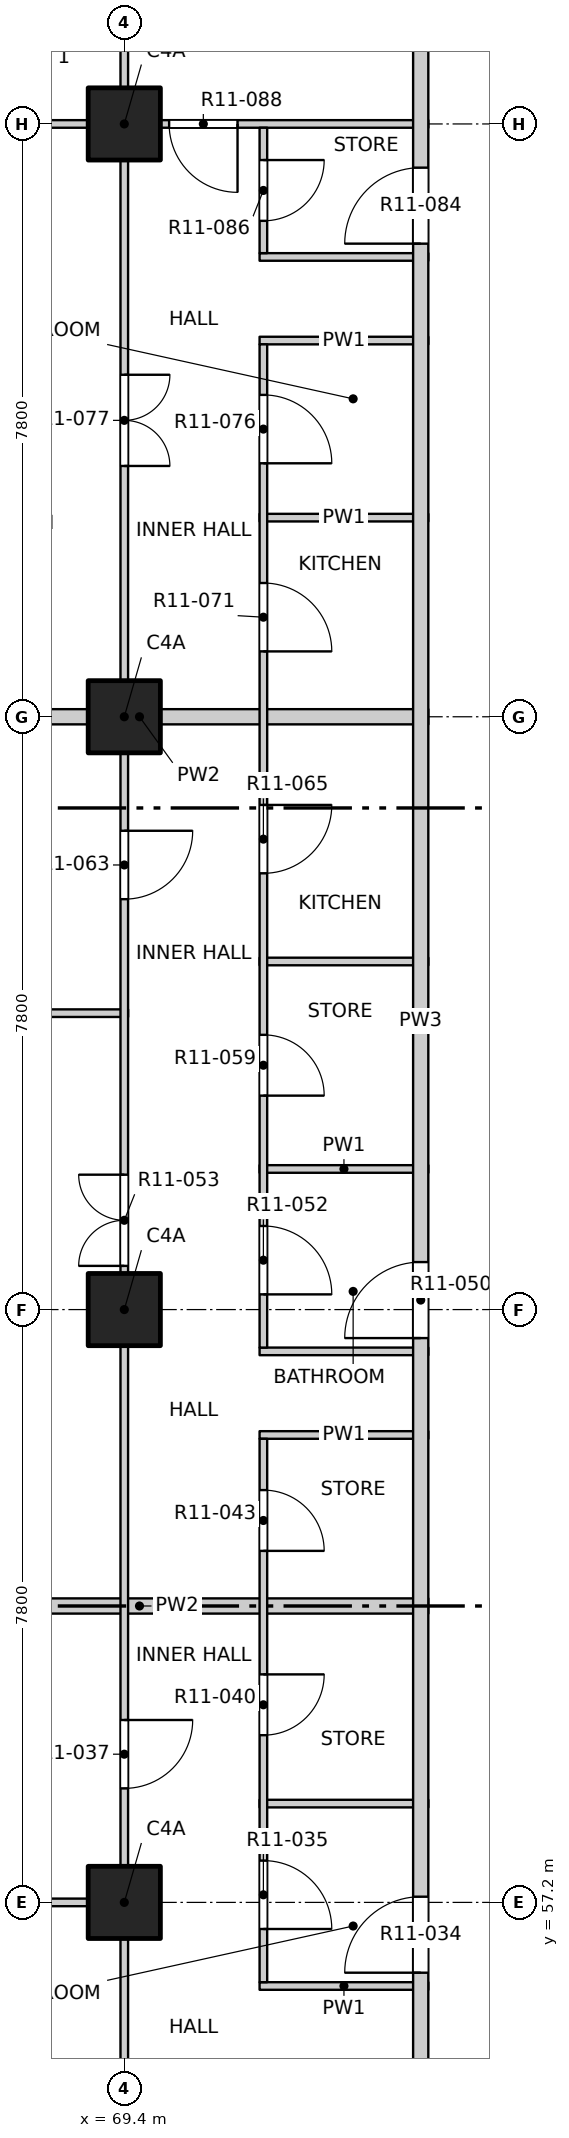
"""IFC4 building model, lengths in metres.
Left out: names, types, materials, properties, quantities, classifications, styles, units other than length and angle.
Written with IfcOpenShell. Run it as: python <this file> out.ifc"""

import sys

from ifc_helpers import new_model, si_unit, direction, frame, frame_2d, origin, origin_2d, place, context, subcontext, project, spatial, rectangle, extrude, element, fill, save


model = new_model("IFC4")
c1 = context("Model", 3, precision=1e-05, world=origin(), true_north=direction((0.0, 1.0)))
c2 = subcontext(c1, "Body", "Model", "MODEL_VIEW")
j1 = project(units=[si_unit("LENGTHUNIT", "METRE"), si_unit("PLANEANGLEUNIT", "RADIAN")], contexts=[c1])
p1 = place(None, origin())
s1 = spatial("IfcSite", under=j1, at=p1, CompositionType="ELEMENT")
p2 = place(p1, origin())
s2 = spatial("IfcBuilding", under=s1, at=p2, CompositionType="ELEMENT")
p3 = place(p2, frame((0.0, 0.0, 130.5)))
s3 = spatial("IfcBuildingStorey", under=s2, at=p3, CompositionType="ELEMENT", Elevation=130.5)
for number, where, z_axis, x_axis in (
    (1, (69.4, 57.2, -0.25), (0.0, 0.0, 1.0), (1.0, 0.0, 0.0)),
    (2, (69.4, 65.0, -0.25), (0.0, 0.0, 1.0), (1.0, 0.0, 0.0)),
    (3, (69.4, 72.8, -0.25), (0.0, 0.0, 1.0), (1.0, 0.0, 0.0)),
    (4, (69.4, 80.6, -0.25), (0.0, 0.0, 1.0), (1.0, 0.0, 0.0)),
):
    element("IfcColumn", number, at=place(p3, frame(where, z_axis=z_axis, x_axis=x_axis)), inside=s3, PredefinedType="COLUMN", context=c2, shape_type="SweptSolid", body=[
        extrude(rectangle(XDim=0.95, YDim=0.95, at=origin_2d()), origin(), (0.0, 0.0, 1.0), 3.4),
    ])
p4 = place(p3, frame((71.18, 56.1, 0.0), z_axis=(0.0, 0.0, 1.0), x_axis=(1.0, 0.0, 0.0)))
e5 = element("IfcWall", 5, at=p4, inside=s3, PredefinedType="PARTITIONING", context=c2, shape_type="SweptSolid", body=[
    extrude(rectangle(XDim=2.22, YDim=0.1, at=frame_2d((1.11, 0.0))), origin(), (0.0, 0.0, 1.0), 3.15),
])
p5 = place(p3, frame((65.8, 57.2, 0.0), z_axis=(0.0, 0.0, 1.0), x_axis=(1.0, 0.0, 0.0)))
e6 = element("IfcWall", 6, at=p5, inside=s3, PredefinedType="PARTITIONING", context=c2, shape_type="SweptSolid", body=[
    extrude(rectangle(XDim=3.65, YDim=0.1, at=frame_2d((1.825, 0.0))), origin(), (0.0, 0.0, 1.0), 3.15),
])
p6 = place(p3, frame((71.18, 58.5, 0.0), z_axis=(0.0, 0.0, 1.0), x_axis=(1.0, 0.0, 0.0)))
e7 = element("IfcWall", 7, at=p6, inside=s3, PredefinedType="PARTITIONING", context=c2, shape_type="SweptSolid", body=[
    extrude(rectangle(XDim=2.22, YDim=0.1, at=frame_2d((1.11, 0.0))), origin(), (0.0, 0.0, 1.0), 3.15),
])
p7 = place(p3, frame((65.8, 61.1, 0.0), z_axis=(0.0, 0.0, 1.0), x_axis=(1.0, 0.0, 0.0)))
e8 = element("IfcWall", 8, at=p7, inside=s3, PredefinedType="PARTITIONING", context=c2, shape_type="SweptSolid", body=[
    extrude(rectangle(XDim=7.6, YDim=0.2, at=frame_2d((3.8, 0.0))), origin(), (0.0, 0.0, 1.0), 2.55),
])
for number, where, z_axis, x_axis in (
    (9, (71.18, 63.35, 0.0), (0.0, 0.0, 1.0), (1.0, 0.0, 0.0)),
    (10, (71.18, 64.45, 0.0), (0.0, 0.0, 1.0), (1.0, 0.0, 0.0)),
    (11, (71.18, 66.85, 0.0), (0.0, 0.0, 1.0), (1.0, 0.0, 0.0)),
):
    element("IfcWall", number, at=place(p3, frame(where, z_axis=z_axis, x_axis=x_axis)), inside=s3, PredefinedType="PARTITIONING", context=c2, shape_type="SweptSolid", body=[
        extrude(rectangle(XDim=2.22, YDim=0.1, at=frame_2d((1.11, 0.0))), origin(), (0.0, 0.0, 1.0), 3.15),
    ])
p8 = place(p3, frame((65.8, 68.9, 0.0), z_axis=(0.0, 0.0, 1.0), x_axis=(1.0, 0.0, 0.0)))
e12 = element("IfcWall", 12, at=p8, inside=s3, PredefinedType="PARTITIONING", context=c2, shape_type="SweptSolid", body=[
    extrude(rectangle(XDim=3.65, YDim=0.1, at=frame_2d((1.825, 0.0))), origin(), (0.0, 0.0, 1.0), 2.55),
])
p9 = place(p3, frame((71.18, 69.58, 0.0), z_axis=(0.0, 0.0, 1.0), x_axis=(1.0, 0.0, 0.0)))
e13 = element("IfcWall", 13, at=p9, inside=s3, PredefinedType="PARTITIONING", context=c2, shape_type="SweptSolid", body=[
    extrude(rectangle(XDim=2.22, YDim=0.1, at=frame_2d((1.11, 0.0))), origin(), (0.0, 0.0, 1.0), 3.15),
])
p10 = place(p3, frame((65.8, 72.8, 0.0), z_axis=(0.0, 0.0, 1.0), x_axis=(1.0, 0.0, 0.0)))
e14 = element("IfcWall", 14, at=p10, inside=s3, PredefinedType="PARTITIONING", context=c2, shape_type="SweptSolid", body=[
    extrude(rectangle(XDim=7.6, YDim=0.2, at=frame_2d((3.8, 0.0))), origin(), (0.0, 0.0, 1.0), 3.15),
])
for number, where, z_axis, x_axis in (
    (15, (71.18, 75.42, 0.0), (0.0, 0.0, 1.0), (1.0, 0.0, 0.0)),
    (16, (71.18, 77.75, 0.0), (0.0, 0.0, 1.0), (1.0, 0.0, 0.0)),
    (17, (71.18, 78.85, 0.0), (0.0, 0.0, 1.0), (1.0, 0.0, 0.0)),
):
    element("IfcWall", number, at=place(p3, frame(where, z_axis=z_axis, x_axis=x_axis)), inside=s3, PredefinedType="PARTITIONING", context=c2, shape_type="SweptSolid", body=[
        extrude(rectangle(XDim=2.22, YDim=0.1, at=frame_2d((1.11, 0.0))), origin(), (0.0, 0.0, 1.0), 3.15),
    ])
p11 = place(p3, frame((65.8, 80.6, 0.0), z_axis=(0.0, 0.0, 1.0), x_axis=(1.0, 0.0, 0.0)))
e18 = element("IfcWall", 18, at=p11, inside=s3, PredefinedType="PARTITIONING", context=c2, shape_type="SweptSolid", body=[
    extrude(rectangle(XDim=7.6, YDim=0.1, at=frame_2d((3.8, 0.0))), origin(), (0.0, 0.0, 1.0), 3.15),
])
p12 = place(p11, frame((4.19, 0.0, 0.0)))
e19 = element("IfcOpeningElement", 19, at=p12, cuts=e18, PredefinedType="OPENING", context=c2, shape_type="SweptSolid", body=[
    extrude(rectangle(XDim=0.9, YDim=2.1, at=frame_2d((0.45, 1.05))), frame((0.0, 0.06, 0.0), z_axis=(0.0, -1.0, 0.0), x_axis=(1.0, 0.0, 0.0)), (0.0, 0.0, 1.0), 0.12),
])
p13 = place(p3, frame((69.4, 45.8, 0.0), z_axis=(0.0, 0.0, 1.0), x_axis=(0.0, 1.0, 0.0)))
e20 = element("IfcWall", 20, at=p13, inside=s3, PredefinedType="PARTITIONING", context=c2, shape_type="SweptSolid", body=[
    extrude(rectangle(XDim=38.4, YDim=0.1, at=frame_2d((19.2, 0.0))), origin(), (0.0, 0.0, 1.0), 3.15),
])
p14 = place(p13, frame((1.05, 0.0, 0.0)))
e21 = element("IfcOpeningElement", 21, at=p14, cuts=e20, PredefinedType="OPENING", context=c2, shape_type="SweptSolid", body=[
    extrude(rectangle(XDim=1.2, YDim=2.1, at=frame_2d((0.6, 1.05))), frame((0.0, 0.06, 0.0), z_axis=(0.0, -1.0, 0.0), x_axis=(1.0, 0.0, 0.0)), (0.0, 0.0, 1.0), 0.12),
])
p15 = place(p13, frame((6.9, 0.0, 0.0)))
e22 = element("IfcOpeningElement", 22, at=p15, cuts=e20, PredefinedType="OPENING", context=c2, shape_type="SweptSolid", body=[
    extrude(rectangle(XDim=1.2, YDim=2.1, at=frame_2d((0.6, 1.05))), frame((0.0, 0.06, 0.0), z_axis=(0.0, -1.0, 0.0), x_axis=(1.0, 0.0, 0.0)), (0.0, 0.0, 1.0), 0.12),
])
p16 = place(p13, frame((12.9, 0.0, 0.0)))
e23 = element("IfcOpeningElement", 23, at=p16, cuts=e20, PredefinedType="OPENING", context=c2, shape_type="SweptSolid", body=[
    extrude(rectangle(XDim=0.9, YDim=2.1, at=frame_2d((0.45, 1.05))), frame((0.0, 0.06, 0.0), z_axis=(0.0, -1.0, 0.0), x_axis=(1.0, 0.0, 0.0)), (0.0, 0.0, 1.0), 0.12),
])
p17 = place(p13, frame((19.775, 0.0, 0.0)))
e24 = element("IfcOpeningElement", 24, at=p17, cuts=e20, PredefinedType="OPENING", context=c2, shape_type="SweptSolid", body=[
    extrude(rectangle(XDim=1.2, YDim=2.1, at=frame_2d((0.6, 1.05))), frame((0.0, 0.06, 0.0), z_axis=(0.0, -1.0, 0.0), x_axis=(1.0, 0.0, 0.0)), (0.0, 0.0, 1.0), 0.12),
])
p18 = place(p13, frame((24.6, 0.0, 0.0)))
e25 = element("IfcOpeningElement", 25, at=p18, cuts=e20, PredefinedType="OPENING", context=c2, shape_type="SweptSolid", body=[
    extrude(rectangle(XDim=0.9, YDim=2.1, at=frame_2d((0.45, 1.05))), frame((0.0, 0.06, 0.0), z_axis=(0.0, -1.0, 0.0), x_axis=(1.0, 0.0, 0.0)), (0.0, 0.0, 1.0), 0.12),
])
p19 = place(p13, frame((30.3, 0.0, 0.0)))
e26 = element("IfcOpeningElement", 26, at=p19, cuts=e20, PredefinedType="OPENING", context=c2, shape_type="SweptSolid", body=[
    extrude(rectangle(XDim=1.2, YDim=2.1, at=frame_2d((0.6, 1.05))), frame((0.0, 0.06, 0.0), z_axis=(0.0, -1.0, 0.0), x_axis=(1.0, 0.0, 0.0)), (0.0, 0.0, 1.0), 0.12),
])
p20 = place(p13, frame((36.15, 0.0, 0.0)))
e27 = element("IfcOpeningElement", 27, at=p20, cuts=e20, PredefinedType="OPENING", context=c2, shape_type="SweptSolid", body=[
    extrude(rectangle(XDim=1.2, YDim=2.1, at=frame_2d((0.6, 1.05))), frame((0.0, 0.06, 0.0), z_axis=(0.0, -1.0, 0.0), x_axis=(1.0, 0.0, 0.0)), (0.0, 0.0, 1.0), 0.12),
])
p21 = place(p3, frame((71.23, 56.15, 0.0), z_axis=(0.0, 0.0, 1.0), x_axis=(0.0, 1.0, 0.0)))
e28 = element("IfcWall", 28, at=p21, inside=s3, PredefinedType="PARTITIONING", context=c2, shape_type="SweptSolid", body=[
    extrude(rectangle(XDim=7.15, YDim=0.1, at=frame_2d((3.575, 0.0))), origin(), (0.0, 0.0, 1.0), 3.15),
])
p22 = place(p21, frame((0.7, 0.0, 0.0)))
e29 = element("IfcOpeningElement", 29, at=p22, cuts=e28, PredefinedType="OPENING", context=c2, shape_type="SweptSolid", body=[
    extrude(rectangle(XDim=0.9, YDim=2.1, at=frame_2d((0.45, 1.05))), frame((0.0, 0.06, 0.0), z_axis=(0.0, -1.0, 0.0), x_axis=(1.0, 0.0, 0.0)), (0.0, 0.0, 1.0), 0.12),
])
p23 = place(p21, frame((3.25, 0.0, 0.0)))
e30 = element("IfcOpeningElement", 30, at=p23, cuts=e28, PredefinedType="OPENING", context=c2, shape_type="SweptSolid", body=[
    extrude(rectangle(XDim=0.8, YDim=2.1, at=frame_2d((0.4, 1.05))), frame((0.0, 0.06, 0.0), z_axis=(0.0, -1.0, 0.0), x_axis=(1.0, 0.0, 0.0)), (0.0, 0.0, 1.0), 0.12),
])
p24 = place(p21, frame((5.675, 0.0, 0.0)))
e31 = element("IfcOpeningElement", 31, at=p24, cuts=e28, PredefinedType="OPENING", context=c2, shape_type="SweptSolid", body=[
    extrude(rectangle(XDim=0.8, YDim=2.1, at=frame_2d((0.4, 1.05))), frame((0.0, 0.06, 0.0), z_axis=(0.0, -1.0, 0.0), x_axis=(1.0, 0.0, 0.0)), (0.0, 0.0, 1.0), 0.12),
])
p25 = place(p3, frame((71.23, 64.5, 0.0), z_axis=(0.0, 0.0, 1.0), x_axis=(0.0, 1.0, 0.0)))
e32 = element("IfcWall", 32, at=p25, inside=s3, PredefinedType="PARTITIONING", context=c2, shape_type="SweptSolid", body=[
    extrude(rectangle(XDim=13.2, YDim=0.1, at=frame_2d((6.6, 0.0))), origin(), (0.0, 0.0, 1.0), 3.15),
])
p26 = place(p25, frame((0.7, 0.0, 0.0)))
e33 = element("IfcOpeningElement", 33, at=p26, cuts=e32, PredefinedType="OPENING", context=c2, shape_type="SweptSolid", body=[
    extrude(rectangle(XDim=0.9, YDim=2.1, at=frame_2d((0.45, 1.05))), frame((0.0, 0.06, 0.0), z_axis=(0.0, -1.0, 0.0), x_axis=(1.0, 0.0, 0.0)), (0.0, 0.0, 1.0), 0.12),
])
p27 = place(p25, frame((3.315, 0.0, 0.0)))
e34 = element("IfcOpeningElement", 34, at=p27, cuts=e32, PredefinedType="OPENING", context=c2, shape_type="SweptSolid", body=[
    extrude(rectangle(XDim=0.8, YDim=2.1, at=frame_2d((0.4, 1.05))), frame((0.0, 0.06, 0.0), z_axis=(0.0, -1.0, 0.0), x_axis=(1.0, 0.0, 0.0)), (0.0, 0.0, 1.0), 0.12),
])
p28 = place(p25, frame((6.24, 0.0, 0.0)))
e35 = element("IfcOpeningElement", 35, at=p28, cuts=e32, PredefinedType="OPENING", context=c2, shape_type="SweptSolid", body=[
    extrude(rectangle(XDim=0.9, YDim=2.1, at=frame_2d((0.45, 1.05))), frame((0.0, 0.06, 0.0), z_axis=(0.0, -1.0, 0.0), x_axis=(1.0, 0.0, 0.0)), (0.0, 0.0, 1.0), 0.12),
])
p29 = place(p25, frame((9.16, 0.0, 0.0)))
e36 = element("IfcOpeningElement", 36, at=p29, cuts=e32, PredefinedType="OPENING", context=c2, shape_type="SweptSolid", body=[
    extrude(rectangle(XDim=0.9, YDim=2.1, at=frame_2d((0.45, 1.05))), frame((0.0, 0.06, 0.0), z_axis=(0.0, -1.0, 0.0), x_axis=(1.0, 0.0, 0.0)), (0.0, 0.0, 1.0), 0.12),
])
p30 = place(p25, frame((11.635, 0.0, 0.0)))
e37 = element("IfcOpeningElement", 37, at=p30, cuts=e32, PredefinedType="OPENING", context=c2, shape_type="SweptSolid", body=[
    extrude(rectangle(XDim=0.9, YDim=2.1, at=frame_2d((0.45, 1.05))), frame((0.0, 0.06, 0.0), z_axis=(0.0, -1.0, 0.0), x_axis=(1.0, 0.0, 0.0)), (0.0, 0.0, 1.0), 0.12),
])
p31 = place(p3, frame((71.23, 78.9, 0.0), z_axis=(0.0, 0.0, 1.0), x_axis=(0.0, 1.0, 0.0)))
e38 = element("IfcWall", 38, at=p31, inside=s3, PredefinedType="PARTITIONING", context=c2, shape_type="SweptSolid", body=[
    extrude(rectangle(XDim=1.65, YDim=0.1, at=frame_2d((0.825, 0.0))), origin(), (0.0, 0.0, 1.0), 3.15),
])
p32 = place(p31, frame((0.425, 0.0, 0.0)))
e39 = element("IfcOpeningElement", 39, at=p32, cuts=e38, PredefinedType="OPENING", context=c2, shape_type="SweptSolid", body=[
    extrude(rectangle(XDim=0.8, YDim=2.1, at=frame_2d((0.4, 1.05))), frame((0.0, 0.06, 0.0), z_axis=(0.0, -1.0, 0.0), x_axis=(1.0, 0.0, 0.0)), (0.0, 0.0, 1.0), 0.12),
])
p33 = place(p3, frame((73.3, 53.4, 0.0), z_axis=(0.0, 0.0, 1.0), x_axis=(0.0, 1.0, 0.0)))
e40 = element("IfcWall", 40, at=p33, inside=s3, PredefinedType="PARTITIONING", context=c2, shape_type="SweptSolid", body=[
    extrude(rectangle(XDim=30.8, YDim=0.2, at=frame_2d((15.4, 0.0))), origin(), (0.0, 0.0, 1.0), 3.15),
])
p34 = place(p33, frame((2.875, 0.0, 0.0)))
e41 = element("IfcOpeningElement", 41, at=p34, cuts=e40, PredefinedType="OPENING", context=c2, shape_type="SweptSolid", body=[
    extrude(rectangle(XDim=1.0, YDim=2.1, at=frame_2d((0.5, 1.05))), frame((0.0, 0.11, 0.0), z_axis=(0.0, -1.0, 0.0), x_axis=(1.0, 0.0, 0.0)), (0.0, 0.0, 1.0), 0.22),
])
p35 = place(p33, frame((11.225, 0.0, 0.0)))
e42 = element("IfcOpeningElement", 42, at=p35, cuts=e40, PredefinedType="OPENING", context=c2, shape_type="SweptSolid", body=[
    extrude(rectangle(XDim=1.0, YDim=2.1, at=frame_2d((0.5, 1.05))), frame((0.0, 0.11, 0.0), z_axis=(0.0, -1.0, 0.0), x_axis=(1.0, 0.0, 0.0)), (0.0, 0.0, 1.0), 0.22),
])
p36 = place(p33, frame((25.625, 0.0, 0.0)))
e43 = element("IfcOpeningElement", 43, at=p36, cuts=e40, PredefinedType="OPENING", context=c2, shape_type="SweptSolid", body=[
    extrude(rectangle(XDim=1.0, YDim=2.1, at=frame_2d((0.5, 1.05))), frame((0.0, 0.11, 0.0), z_axis=(0.0, -1.0, 0.0), x_axis=(1.0, 0.0, 0.0)), (0.0, 0.0, 1.0), 0.22),
])
p37 = place(p34, origin())
e44 = element("IfcDoor", 44, at=p37, inside=s3, OperationType="SINGLE_SWING_RIGHT", PredefinedType="DOOR", context=c2, shape_type="SweptSolid", body=[
    extrude(rectangle(XDim=1.0, YDim=2.1, at=frame_2d((0.5, 1.05))), frame((0.0, 0.025, 0.0), z_axis=(0.0, -1.0, 0.0), x_axis=(1.0, 0.0, 0.0)), (0.0, 0.0, 1.0), 0.05),
])
fill(e41, e44)
p38 = place(p22, origin())
e45 = element("IfcDoor", 45, at=p38, inside=s3, OperationType="SINGLE_SWING_RIGHT", PredefinedType="DOOR", context=c2, shape_type="SweptSolid", body=[
    extrude(rectangle(XDim=0.9, YDim=2.1, at=frame_2d((0.45, 1.05))), frame((0.0, 0.025, 0.0), z_axis=(0.0, -1.0, 0.0), x_axis=(1.0, 0.0, 0.0)), (0.0, 0.0, 1.0), 0.05),
])
fill(e29, e45)
p39 = place(p16, origin())
e46 = element("IfcDoor", 46, at=p39, inside=s3, OperationType="SINGLE_SWING_LEFT", PredefinedType="DOOR", context=c2, shape_type="SweptSolid", body=[
    extrude(rectangle(XDim=0.9, YDim=2.1, at=frame_2d((0.45, 1.05))), frame((0.0, 0.025, 0.0), z_axis=(0.0, -1.0, 0.0), x_axis=(1.0, 0.0, 0.0)), (0.0, 0.0, 1.0), 0.05),
])
fill(e23, e46)
p40 = place(p23, origin())
e47 = element("IfcDoor", 47, at=p40, inside=s3, OperationType="SINGLE_SWING_LEFT", PredefinedType="DOOR", context=c2, shape_type="SweptSolid", body=[
    extrude(rectangle(XDim=0.8, YDim=2.1, at=frame_2d((0.4, 1.05))), frame((0.0, 0.025, 0.0), z_axis=(0.0, -1.0, 0.0), x_axis=(1.0, 0.0, 0.0)), (0.0, 0.0, 1.0), 0.05),
])
fill(e30, e47)
p41 = place(p24, origin())
e48 = element("IfcDoor", 48, at=p41, inside=s3, OperationType="SINGLE_SWING_RIGHT", PredefinedType="DOOR", context=c2, shape_type="SweptSolid", body=[
    extrude(rectangle(XDim=0.8, YDim=2.1, at=frame_2d((0.4, 1.05))), frame((0.0, 0.025, 0.0), z_axis=(0.0, -1.0, 0.0), x_axis=(1.0, 0.0, 0.0)), (0.0, 0.0, 1.0), 0.05),
])
fill(e31, e48)
p42 = place(p35, origin())
e49 = element("IfcDoor", 49, at=p42, inside=s3, OperationType="SINGLE_SWING_RIGHT", PredefinedType="DOOR", context=c2, shape_type="SweptSolid", body=[
    extrude(rectangle(XDim=1.0, YDim=2.1, at=frame_2d((0.5, 1.05))), frame((0.0, 0.025, 0.0), z_axis=(0.0, -1.0, 0.0), x_axis=(1.0, 0.0, 0.0)), (0.0, 0.0, 1.0), 0.05),
])
fill(e42, e49)
p43 = place(p26, origin())
e50 = element("IfcDoor", 50, at=p43, inside=s3, OperationType="SINGLE_SWING_RIGHT", PredefinedType="DOOR", context=c2, shape_type="SweptSolid", body=[
    extrude(rectangle(XDim=0.9, YDim=2.1, at=frame_2d((0.45, 1.05))), frame((0.0, 0.025, 0.0), z_axis=(0.0, -1.0, 0.0), x_axis=(1.0, 0.0, 0.0)), (0.0, 0.0, 1.0), 0.05),
])
fill(e33, e50)
p44 = place(p17, origin())
e51 = element("IfcDoor", 51, at=p44, inside=s3, OperationType="DOUBLE_DOOR_SINGLE_SWING", PredefinedType="DOOR", context=c2, shape_type="SweptSolid", body=[
    extrude(rectangle(XDim=1.2, YDim=2.1, at=frame_2d((0.6, 1.05))), frame((0.0, 0.025, 0.0), z_axis=(0.0, -1.0, 0.0), x_axis=(1.0, 0.0, 0.0)), (0.0, 0.0, 1.0), 0.05),
])
fill(e24, e51)
p45 = place(p27, origin())
e52 = element("IfcDoor", 52, at=p45, inside=s3, OperationType="SINGLE_SWING_RIGHT", PredefinedType="DOOR", context=c2, shape_type="SweptSolid", body=[
    extrude(rectangle(XDim=0.8, YDim=2.1, at=frame_2d((0.4, 1.05))), frame((0.0, 0.025, 0.0), z_axis=(0.0, -1.0, 0.0), x_axis=(1.0, 0.0, 0.0)), (0.0, 0.0, 1.0), 0.05),
])
fill(e34, e52)
p46 = place(p18, origin())
e53 = element("IfcDoor", 53, at=p46, inside=s3, OperationType="SINGLE_SWING_LEFT", PredefinedType="DOOR", context=c2, shape_type="SweptSolid", body=[
    extrude(rectangle(XDim=0.9, YDim=2.1, at=frame_2d((0.45, 1.05))), frame((0.0, 0.025, 0.0), z_axis=(0.0, -1.0, 0.0), x_axis=(1.0, 0.0, 0.0)), (0.0, 0.0, 1.0), 0.05),
])
fill(e25, e53)
p47 = place(p28, origin())
e54 = element("IfcDoor", 54, at=p47, inside=s3, OperationType="SINGLE_SWING_LEFT", PredefinedType="DOOR", context=c2, shape_type="SweptSolid", body=[
    extrude(rectangle(XDim=0.9, YDim=2.1, at=frame_2d((0.45, 1.05))), frame((0.0, 0.025, 0.0), z_axis=(0.0, -1.0, 0.0), x_axis=(1.0, 0.0, 0.0)), (0.0, 0.0, 1.0), 0.05),
])
fill(e35, e54)
p48 = place(p29, origin())
e55 = element("IfcDoor", 55, at=p48, inside=s3, OperationType="SINGLE_SWING_RIGHT", PredefinedType="DOOR", context=c2, shape_type="SweptSolid", body=[
    extrude(rectangle(XDim=0.9, YDim=2.1, at=frame_2d((0.45, 1.05))), frame((0.0, 0.025, 0.0), z_axis=(0.0, -1.0, 0.0), x_axis=(1.0, 0.0, 0.0)), (0.0, 0.0, 1.0), 0.05),
])
fill(e36, e55)
p49 = place(p30, origin())
e56 = element("IfcDoor", 56, at=p49, inside=s3, OperationType="SINGLE_SWING_RIGHT", PredefinedType="DOOR", context=c2, shape_type="SweptSolid", body=[
    extrude(rectangle(XDim=0.9, YDim=2.1, at=frame_2d((0.45, 1.05))), frame((0.0, 0.025, 0.0), z_axis=(0.0, -1.0, 0.0), x_axis=(1.0, 0.0, 0.0)), (0.0, 0.0, 1.0), 0.05),
])
fill(e37, e56)
p50 = place(p19, origin())
e57 = element("IfcDoor", 57, at=p50, inside=s3, OperationType="DOUBLE_DOOR_SINGLE_SWING", PredefinedType="DOOR", context=c2, shape_type="SweptSolid", body=[
    extrude(rectangle(XDim=1.2, YDim=2.1, at=frame_2d((0.6, 1.05))), frame((0.0, 0.025, 0.0), z_axis=(0.0, -1.0, 0.0), x_axis=(1.0, 0.0, 0.0)), (0.0, 0.0, 1.0), 0.05),
])
fill(e26, e57)
p51 = place(p36, origin())
e58 = element("IfcDoor", 58, at=p51, inside=s3, OperationType="SINGLE_SWING_RIGHT", PredefinedType="DOOR", context=c2, shape_type="SweptSolid", body=[
    extrude(rectangle(XDim=1.0, YDim=2.1, at=frame_2d((0.5, 1.05))), frame((0.0, 0.025, 0.0), z_axis=(0.0, -1.0, 0.0), x_axis=(1.0, 0.0, 0.0)), (0.0, 0.0, 1.0), 0.05),
])
fill(e43, e58)
p52 = place(p32, origin())
e59 = element("IfcDoor", 59, at=p52, inside=s3, OperationType="SINGLE_SWING_LEFT", PredefinedType="DOOR", context=c2, shape_type="SweptSolid", body=[
    extrude(rectangle(XDim=0.8, YDim=2.1, at=frame_2d((0.4, 1.05))), frame((0.0, 0.025, 0.0), z_axis=(0.0, -1.0, 0.0), x_axis=(1.0, 0.0, 0.0)), (0.0, 0.0, 1.0), 0.05),
])
fill(e39, e59)
p53 = place(p12, origin())
e60 = element("IfcDoor", 60, at=p53, inside=s3, OperationType="SINGLE_SWING_LEFT", PredefinedType="DOOR", context=c2, shape_type="SweptSolid", body=[
    extrude(rectangle(XDim=0.9, YDim=2.1, at=frame_2d((0.45, 1.05))), frame((0.0, 0.025, 0.0), z_axis=(0.0, -1.0, 0.0), x_axis=(1.0, 0.0, 0.0)), (0.0, 0.0, 1.0), 0.05),
])
fill(e19, e60)
save(model, sys.argv[1])
